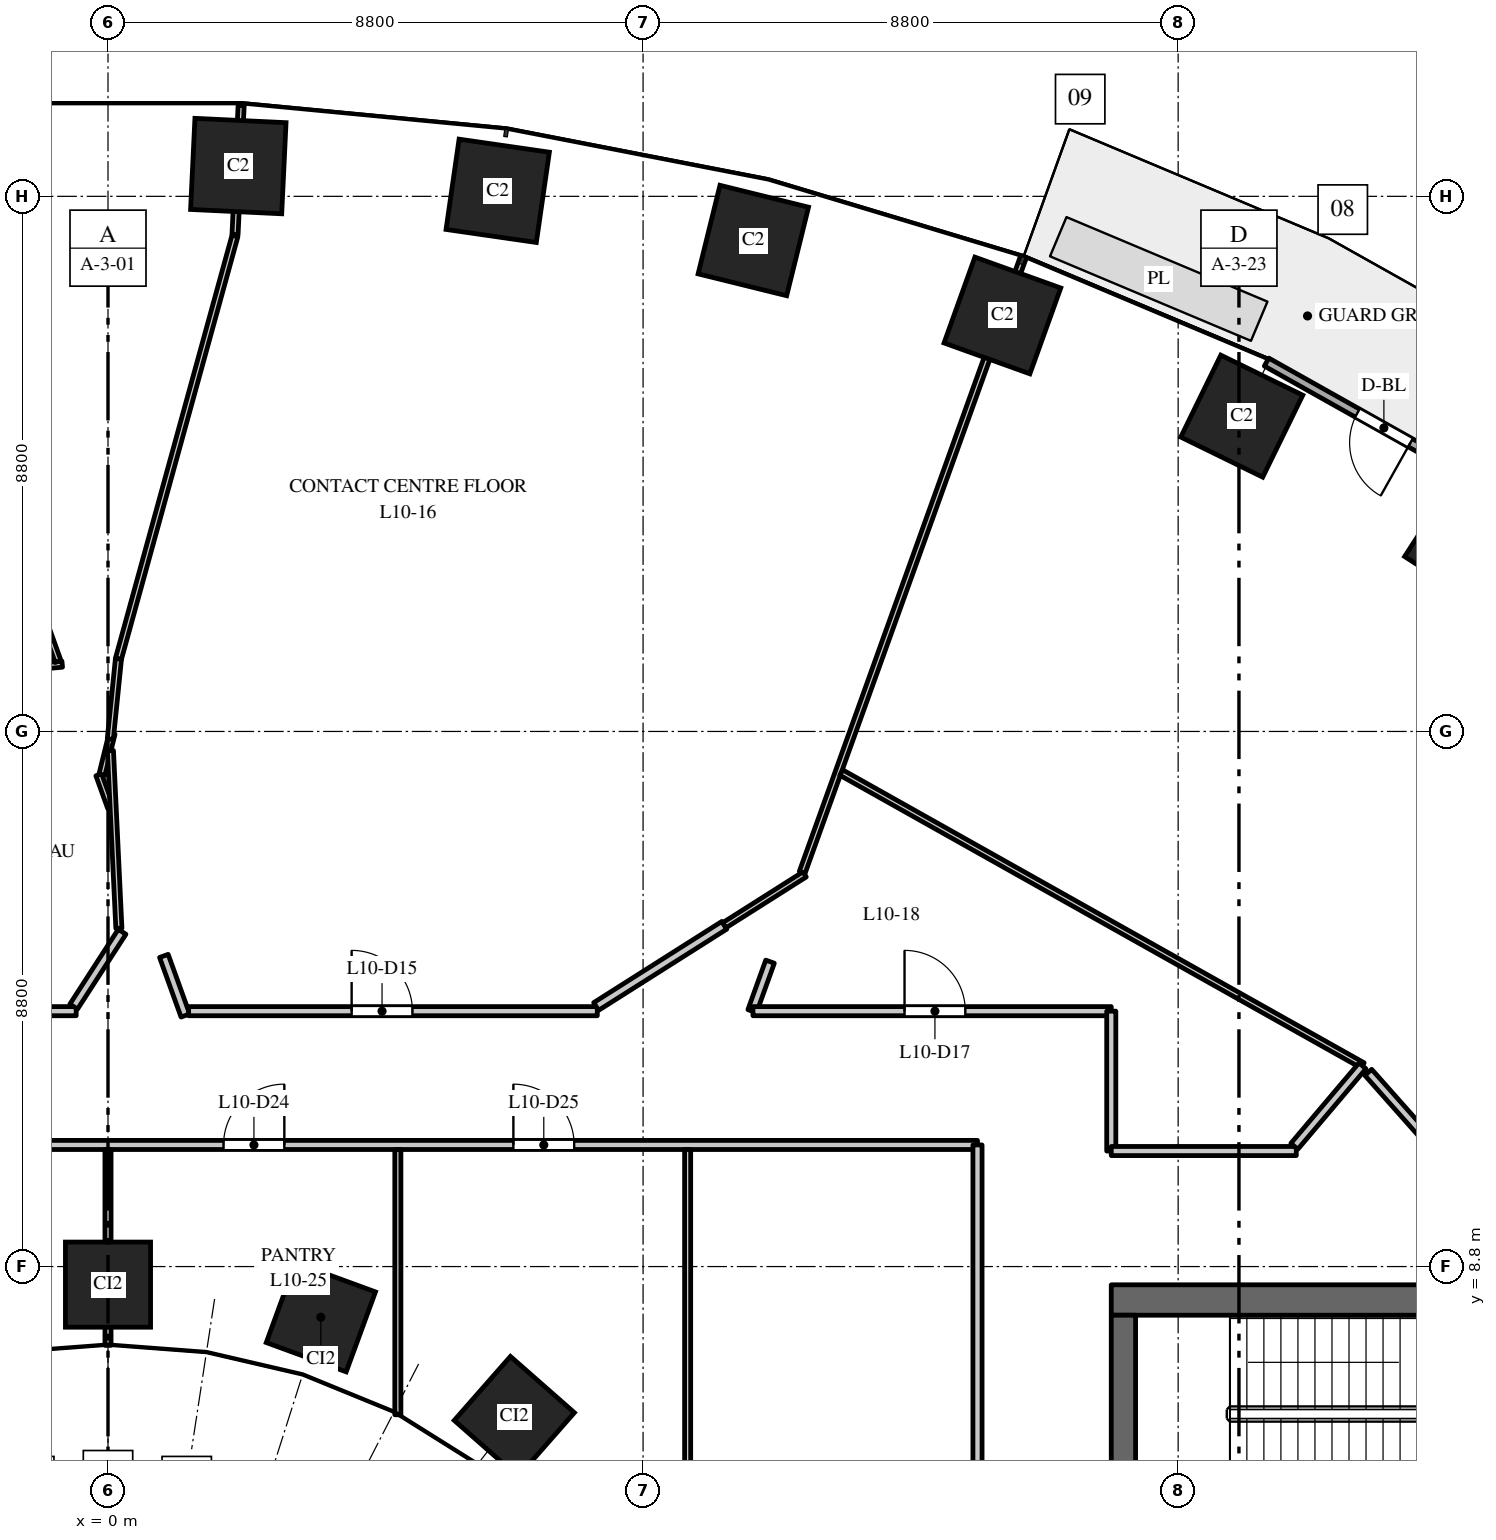
"""IFC4 building model, lengths in metres.
Left out: names, types, materials, properties, quantities, classifications, styles, units other than length and angle.
Written with IfcOpenShell. Run it as: python <this file> out.ifc"""

import sys

from ifc_helpers import new_model, si_unit, direction, frame, frame_2d, origin, origin_2d, place, context, subcontext, project, spatial, rectangle, extrude, element, fill, save


model = new_model("IFC4")
c1 = context("Model", 3, precision=1e-05, world=origin(), true_north=direction((0.0, 1.0)))
c2 = subcontext(c1, "Body", "Model", "MODEL_VIEW")
j1 = project(units=[si_unit("LENGTHUNIT", "METRE"), si_unit("PLANEANGLEUNIT", "RADIAN")], contexts=[c1])
p1 = place(None, origin())
s1 = spatial("IfcSite", under=j1, at=p1, CompositionType="ELEMENT")
p2 = place(p1, origin())
s2 = spatial("IfcBuilding", under=s1, at=p2, CompositionType="ELEMENT")
p3 = place(p2, frame((0.0, 0.0, 50.5)))
s3 = spatial("IfcBuildingStorey", under=s2, at=p3, CompositionType="ELEMENT", Elevation=50.5)
for number, where, z_axis, x_axis in (
    (1, (22.362, 20.7, 0.0), (0.0, 0.0, 1.0), (-0.84, 0.542, 0.0)),
    (2, (18.646, 22.785, 0.0), (0.0, 0.0, 1.0), (-0.898, 0.439, 0.0)),
    (3, (14.709, 24.441, 0.0), (0.0, 0.0, 1.0), (-0.941, 0.338, 0.0)),
    (4, (10.613, 25.674, 0.0), (0.0, 0.0, 1.0), (-0.971, 0.24, 0.0)),
    (5, (6.409, 26.491, 0.0), (0.0, 0.0, 1.0), (-0.99, 0.143, 0.0)),
    (6, (2.143, 26.898, 0.0), (0.0, 0.0, 1.0), (-0.999, 0.048, 0.0)),
):
    element("IfcColumn", number, at=place(p3, frame(where, z_axis=z_axis, x_axis=x_axis)), inside=s3, PredefinedType="COLUMN", context=c2, shape_type="SweptSolid", body=[
        extrude(rectangle(XDim=1.5, YDim=1.5, at=origin_2d()), origin(), (0.0, 0.0, 1.0), 4.0),
    ])
for number, where, z_axis, x_axis in (
    (7, (6.682, 6.334, 0.0), (0.0, 0.0, 1.0), (-0.751, 0.66, 0.0)),
    (8, (3.501, 7.967, 0.0), (0.0, 0.0, 1.0), (-0.939, 0.344, 0.0)),
    (9, (0.0, 8.503, 0.0), (0.0, 0.0, 1.0), (-1.0, 0.0, 0.0)),
):
    element("IfcColumn", number, at=place(p3, frame(where, z_axis=z_axis, x_axis=x_axis)), inside=s3, PredefinedType="COLUMN", context=c2, shape_type="SweptSolid", body=[
        extrude(rectangle(XDim=1.4, YDim=1.4, at=origin_2d()), origin(), (0.0, 0.0, 1.0), 4.0),
    ])
p4 = place(p3, frame((16.5, 8.25, 0.0), z_axis=(0.0, 0.0, 1.0), x_axis=(1.0, 0.0, 0.0)))
e10 = element("IfcWall", 10, at=p4, inside=s3, PredefinedType="SHEAR", context=c2, shape_type="SweptSolid", body=[
    extrude(rectangle(XDim=15.0, YDim=0.5, at=frame_2d((7.5, 0.0))), origin(), (0.0, 0.0, 1.0), 3.7),
])
p5 = place(p4, frame((6.9, 0.0, 0.0)))
e11 = element("IfcOpeningElement", 11, at=p5, cuts=e10, PredefinedType="OPENING", context=c2, shape_type="SweptSolid", body=[
    extrude(rectangle(XDim=1.2, YDim=2.1, at=frame_2d((0.6, 1.05))), frame((0.0, 0.26, 0.0), z_axis=(0.0, -1.0, 0.0), x_axis=(1.0, 0.0, 0.0)), (0.0, 0.0, 1.0), 0.52),
])
p6 = place(p4, frame((12.275, 0.0, 0.0)))
e12 = element("IfcOpeningElement", 12, at=p6, cuts=e10, PredefinedType="OPENING", context=c2, shape_type="SweptSolid", body=[
    extrude(rectangle(XDim=0.9, YDim=2.1, at=frame_2d((0.45, 1.05))), frame((0.0, 0.26, 0.0), z_axis=(0.0, -1.0, 0.0), x_axis=(1.0, 0.0, 0.0)), (0.0, 0.0, 1.0), 0.52),
])
p7 = place(p3, frame((16.7, -8.0, 0.0), z_axis=(0.0, 0.0, 1.0), x_axis=(0.0, 1.0, 0.0)))
e13 = element("IfcWall", 13, at=p7, inside=s3, PredefinedType="SHEAR", context=c2, shape_type="SweptSolid", body=[
    extrude(rectangle(XDim=16.0, YDim=0.4, at=frame_2d((8.0, 0.0))), origin(), (0.0, 0.0, 1.0), 3.7),
])
p8 = place(p3, frame((22.913, 21.509, 0.0), z_axis=(0.0, 0.0, 1.0), x_axis=(-0.872046572975, 0.489422899509, 0.0)))
e14 = element("IfcWall", 14, at=p8, inside=s3, PredefinedType="STANDARD", context=c2, shape_type="SweptSolid", body=[
    extrude(rectangle(XDim=4.426, YDim=0.15, at=frame_2d((2.213, 0.0))), origin(), (0.0, 0.0, 1.0), 3.7),
])
p9 = place(p8, frame((1.713, 0.0, 0.0)))
e15 = element("IfcOpeningElement", 15, at=p9, cuts=e14, PredefinedType="OPENING", context=c2, shape_type="SweptSolid", body=[
    extrude(rectangle(XDim=1.0, YDim=2.4, at=frame_2d((0.5, 1.2))), frame((0.0, 0.085, 0.0), z_axis=(0.0, -1.0, 0.0), x_axis=(1.0, 0.0, 0.0)), (0.0, 0.0, 1.0), 0.17),
])
p10 = place(p3, frame((-14.3, 10.8, 0.0), z_axis=(0.0, 0.0, 1.0), x_axis=(1.0, 0.0, 0.0)))
e16 = element("IfcWall", 16, at=p10, inside=s3, PredefinedType="PARTITIONING", context=c2, shape_type="SweptSolid", body=[
    extrude(rectangle(XDim=28.6, YDim=0.15, at=frame_2d((14.3, 0.0))), origin(), (0.0, 0.0, 1.0), 2.85),
])
p11 = place(p10, frame((11.433, 0.0, 0.0)))
e17 = element("IfcOpeningElement", 17, at=p11, cuts=e16, PredefinedType="OPENING", context=c2, shape_type="SweptSolid", body=[
    extrude(rectangle(XDim=1.0, YDim=2.1, at=frame_2d((0.5, 1.05))), frame((0.0, 0.085, 0.0), z_axis=(0.0, -1.0, 0.0), x_axis=(1.0, 0.0, 0.0)), (0.0, 0.0, 1.0), 0.17),
])
p12 = place(p10, frame((16.2, 0.0, 0.0)))
e18 = element("IfcOpeningElement", 18, at=p12, cuts=e16, PredefinedType="OPENING", context=c2, shape_type="SweptSolid", body=[
    extrude(rectangle(XDim=1.0, YDim=2.1, at=frame_2d((0.5, 1.05))), frame((0.0, 0.085, 0.0), z_axis=(0.0, -1.0, 0.0), x_axis=(1.0, 0.0, 0.0)), (0.0, 0.0, 1.0), 0.17),
])
p13 = place(p10, frame((20.967, 0.0, 0.0)))
e19 = element("IfcOpeningElement", 19, at=p13, cuts=e16, PredefinedType="OPENING", context=c2, shape_type="SweptSolid", body=[
    extrude(rectangle(XDim=1.0, YDim=2.1, at=frame_2d((0.5, 1.05))), frame((0.0, 0.085, 0.0), z_axis=(0.0, -1.0, 0.0), x_axis=(1.0, 0.0, 0.0)), (0.0, 0.0, 1.0), 0.17),
])
p14 = place(p3, frame((-8.704, 17.945, 0.0), z_axis=(0.0, 0.0, 1.0), x_axis=(0.995439666097, 0.095393244838, 0.0)))
e20 = element("IfcWall", 20, at=p14, inside=s3, PredefinedType="PARTITIONING", context=c2, shape_type="SweptSolid", body=[
    extrude(rectangle(XDim=7.988, YDim=0.1, at=frame_2d((3.994, 0.0))), origin(), (0.0, 0.0, 1.0), 2.85),
])
p15 = place(p3, frame((-7.483, 13.0, 0.0), z_axis=(0.0, 0.0, 1.0), x_axis=(1.0, 0.0, 0.0)))
e21 = element("IfcWall", 21, at=p15, inside=s3, PredefinedType="PARTITIONING", context=c2, shape_type="SweptSolid", body=[
    extrude(rectangle(XDim=6.96, YDim=0.15, at=frame_2d((3.48, 0.0))), origin(), (0.0, 0.0, 1.0), 2.85),
])
p16 = place(p15, frame((2.971, 0.0, 0.0)))
e22 = element("IfcOpeningElement", 22, at=p16, cuts=e21, PredefinedType="OPENING", context=c2, shape_type="SweptSolid", body=[
    extrude(rectangle(XDim=1.0, YDim=2.1, at=frame_2d((0.5, 1.05))), frame((0.0, 0.085, 0.0), z_axis=(0.0, -1.0, 0.0), x_axis=(1.0, 0.0, 0.0)), (0.0, 0.0, 1.0), 0.17),
])
p17 = place(p3, frame((-4.046, 27.717, 0.0), z_axis=(0.0, 0.0, 1.0), x_axis=(0.338447260677, -0.940985362129, 0.0)))
e23 = element("IfcWall", 23, at=p17, inside=s3, PredefinedType="PARTITIONING", context=c2, shape_type="SweptSolid", body=[
    extrude(rectangle(XDim=9.528, YDim=0.1, at=frame_2d((4.764, 0.0))), origin(), (0.0, 0.0, 1.0), 2.85),
])
p18 = place(p3, frame((-0.564, 13.075, 0.0), z_axis=(0.0, 0.0, 1.0), x_axis=(0.542961200627, 0.839757783301, 0.0)))
e24 = element("IfcWall", 24, at=p18, inside=s3, PredefinedType="PARTITIONING", context=c2, shape_type="SweptSolid", body=[
    extrude(rectangle(XDim=1.466, YDim=0.15, at=frame_2d((0.733, 0.0))), origin(), (0.0, 0.0, 1.0), 3.7),
])
p19 = place(p3, frame((-0.152, 16.888, 0.0), z_axis=(0.0, 0.0, 1.0), x_axis=(0.339185428329, -0.940719535892, 0.0)))
e25 = element("IfcWall", 25, at=p19, inside=s3, PredefinedType="PARTITIONING", context=c2, shape_type="SweptSolid", body=[
    extrude(rectangle(XDim=0.575, YDim=0.1, at=frame_2d((0.288, 0.0))), origin(), (0.0, 0.0, 1.0), 3.7),
])
p20 = place(p3, frame((-0.099, 16.892, 0.0), z_axis=(0.0, 0.0, 1.0), x_axis=(0.239223165208, 0.970964611728, 0.0)))
e26 = element("IfcWall", 26, at=p20, inside=s3, PredefinedType="PARTITIONING", context=c2, shape_type="SweptSolid", body=[
    extrude(rectangle(XDim=0.694, YDim=0.1, at=frame_2d((0.347, 0.0))), origin(), (0.0, 0.0, 1.0), 3.7),
])
p21 = place(p3, frame((0.0, 7.504, 0.0), z_axis=(0.0, 0.0, 1.0), x_axis=(0.0, 1.0, 0.0)))
e27 = element("IfcWall", 27, at=p21, inside=s3, PredefinedType="PARTITIONING", context=c2, shape_type="SweptSolid", body=[
    extrude(rectangle(XDim=3.221, YDim=0.1, at=frame_2d((1.611, 0.0))), origin(), (0.0, 0.0, 1.0), 3.7),
])
p22 = place(p3, frame((0.04, 17.284, 0.0), z_axis=(0.0, 0.0, 1.0), x_axis=(0.047505648741, -0.998870969314, 0.0)))
e28 = element("IfcWall", 28, at=p22, inside=s3, PredefinedType="PARTITIONING", context=c2, shape_type="SweptSolid", body=[
    extrude(rectangle(XDim=2.924, YDim=0.1, at=frame_2d((1.462, 0.0))), origin(), (0.0, 0.0, 1.0), 3.7),
])
p23 = place(p3, frame((0.038, 17.474, 0.0), z_axis=(0.0, 0.0, 1.0), x_axis=(0.100886401076, 0.99489795159, 0.0)))
e29 = element("IfcWall", 29, at=p23, inside=s3, PredefinedType="PARTITIONING", context=c2, shape_type="SweptSolid", body=[
    extrude(rectangle(XDim=1.329, YDim=0.1, at=frame_2d((0.664, 0.0))), origin(), (0.0, 0.0, 1.0), 3.7),
])
p24 = place(p3, frame((0.172, 18.796, 0.0), z_axis=(0.0, 0.0, 1.0), x_axis=(0.265628515821, 0.964075459486, 0.0)))
e30 = element("IfcWall", 30, at=p24, inside=s3, PredefinedType="PARTITIONING", context=c2, shape_type="SweptSolid", body=[
    extrude(rectangle(XDim=7.212, YDim=0.1, at=frame_2d((3.606, 0.0))), origin(), (0.0, 0.0, 1.0), 3.7),
])
p25 = place(p3, frame((0.919, 13.909, 0.0), z_axis=(0.0, 0.0, 1.0), x_axis=(0.338918653524, -0.94081568136, 0.0)))
e31 = element("IfcWall", 31, at=p25, inside=s3, PredefinedType="PARTITIONING", context=c2, shape_type="SweptSolid", body=[
    extrude(rectangle(XDim=1.042, YDim=0.15, at=frame_2d((0.521, 0.0))), origin(), (0.0, 0.0, 1.0), 3.7),
])
p26 = place(p3, frame((1.326, 13.0, 0.0), z_axis=(0.0, 0.0, 1.0), x_axis=(1.0, 0.0, 0.0)))
e32 = element("IfcWall", 32, at=p26, inside=s3, PredefinedType="PARTITIONING", context=c2, shape_type="SweptSolid", body=[
    extrude(rectangle(XDim=6.721, YDim=0.15, at=frame_2d((3.361, 0.0))), origin(), (0.0, 0.0, 1.0), 2.85),
])
p27 = place(p26, frame((2.681, 0.0, 0.0)))
e33 = element("IfcOpeningElement", 33, at=p27, cuts=e32, PredefinedType="OPENING", context=c2, shape_type="SweptSolid", body=[
    extrude(rectangle(XDim=1.0, YDim=2.1, at=frame_2d((0.5, 1.05))), frame((0.0, 0.085, 0.0), z_axis=(0.0, -1.0, 0.0), x_axis=(1.0, 0.0, 0.0)), (0.0, 0.0, 1.0), 0.17),
])
p28 = place(p3, frame((2.089, 25.77, 0.0), z_axis=(0.0, 0.0, 1.0), x_axis=(0.04733101585, 0.99887925944, 0.0)))
e34 = element("IfcWall", 34, at=p28, inside=s3, PredefinedType="PARTITIONING", context=c2, shape_type="SweptSolid", body=[
    extrude(rectangle(XDim=2.13, YDim=0.1, at=frame_2d((1.065, 0.0))), origin(), (0.0, 0.0, 1.0), 2.85),
])
p29 = place(p3, frame((4.767, 6.363, 0.0), z_axis=(0.0, 0.0, 1.0), x_axis=(0.0, 1.0, 0.0)))
e35 = element("IfcWall", 35, at=p29, inside=s3, PredefinedType="PARTITIONING", context=c2, shape_type="SweptSolid", body=[
    extrude(rectangle(XDim=4.362, YDim=0.1, at=frame_2d((2.181, 0.0))), origin(), (0.0, 0.0, 1.0), 2.85),
])
p30 = place(p3, frame((8.028, 13.077, 0.0), z_axis=(0.0, 0.0, 1.0), x_axis=(0.844718865656, 0.53521027457, 0.0)))
e36 = element("IfcWall", 36, at=p30, inside=s3, PredefinedType="PARTITIONING", context=c2, shape_type="SweptSolid", body=[
    extrude(rectangle(XDim=2.497, YDim=0.15, at=frame_2d((1.248, 0.0))), origin(), (0.0, 0.0, 1.0), 3.7),
])
p31 = place(p3, frame((9.533, -10.725, 0.0), z_axis=(0.0, 0.0, 1.0), x_axis=(0.0, 1.0, 0.0)))
e37 = element("IfcWall", 37, at=p31, inside=s3, PredefinedType="PARTITIONING", context=c2, shape_type="SweptSolid", body=[
    extrude(rectangle(XDim=21.45, YDim=0.1, at=frame_2d((10.725, 0.0))), origin(), (0.0, 0.0, 1.0), 2.75),
])
p32 = place(p3, frame((10.137, 14.413, 0.0), z_axis=(0.0, 0.0, 1.0), x_axis=(0.844849680057, 0.535003755228, 0.0)))
e38 = element("IfcWall", 38, at=p32, inside=s3, PredefinedType="PARTITIONING", context=c2, shape_type="SweptSolid", body=[
    extrude(rectangle(XDim=1.562, YDim=0.1, at=frame_2d((0.781, 0.0))), origin(), (0.0, 0.0, 1.0), 3.7),
])
p33 = place(p3, frame((10.595, 13.0, 0.0), z_axis=(0.0, 0.0, 1.0), x_axis=(0.338659506624, 0.940908995904, 0.0)))
e39 = element("IfcWall", 39, at=p33, inside=s3, PredefinedType="PARTITIONING", context=c2, shape_type="SweptSolid", body=[
    extrude(rectangle(XDim=0.865, YDim=0.15, at=frame_2d((0.433, 0.0))), origin(), (0.0, 0.0, 1.0), 3.7),
])
p34 = place(p3, frame((10.607, 13.0, 0.0), z_axis=(0.0, 0.0, 1.0), x_axis=(1.0, 0.0, 0.0)))
e40 = element("IfcWall", 40, at=p34, inside=s3, PredefinedType="PARTITIONING", context=c2, shape_type="SweptSolid", body=[
    extrude(rectangle(XDim=5.893, YDim=0.15, at=frame_2d((2.947, 0.0))), origin(), (0.0, 0.0, 1.0), 3.7),
])
p35 = place(p34, frame((2.493, 0.0, 0.0)))
e41 = element("IfcOpeningElement", 41, at=p35, cuts=e40, PredefinedType="OPENING", context=c2, shape_type="SweptSolid", body=[
    extrude(rectangle(XDim=1.0, YDim=2.1, at=frame_2d((0.5, 1.05))), frame((0.0, 0.085, 0.0), z_axis=(0.0, -1.0, 0.0), x_axis=(1.0, 0.0, 0.0)), (0.0, 0.0, 1.0), 0.17),
])
p36 = place(p3, frame((11.417, 15.282, 0.0), z_axis=(0.0, 0.0, 1.0), x_axis=(0.338283704349, 0.941044172912, 0.0)))
e42 = element("IfcWall", 42, at=p36, inside=s3, PredefinedType="PARTITIONING", context=c2, shape_type="SweptSolid", body=[
    extrude(rectangle(XDim=10.734, YDim=0.1, at=frame_2d((5.367, 0.0))), origin(), (0.0, 0.0, 1.0), 3.7),
])
p37 = place(p3, frame((12.06, 16.924, 0.0), z_axis=(0.0, 0.0, 1.0), x_axis=(0.871847863021, -0.489776789718, 0.0)))
e43 = element("IfcWall", 43, at=p37, inside=s3, PredefinedType="PARTITIONING", context=c2, shape_type="SweptSolid", body=[
    extrude(rectangle(XDim=9.835, YDim=0.1, at=frame_2d((4.918, 0.0))), origin(), (0.0, 0.0, 1.0), 3.7),
])
p38 = place(p3, frame((14.3, -10.8, 0.0), z_axis=(0.0, 0.0, 1.0), x_axis=(0.0, 1.0, 0.0)))
e44 = element("IfcWall", 44, at=p38, inside=s3, PredefinedType="PARTITIONING", context=c2, shape_type="SweptSolid", body=[
    extrude(rectangle(XDim=21.6, YDim=0.15, at=frame_2d((10.8, 0.0))), origin(), (0.0, 0.0, 1.0), 2.75),
])
p39 = place(p38, frame((10.2, 0.0, 0.0)))
e45 = element("IfcOpeningElement", 45, at=p39, cuts=e44, PredefinedType="OPENING", context=c2, shape_type="SweptSolid", body=[
    extrude(rectangle(XDim=1.0, YDim=2.1, at=frame_2d((0.5, 1.05))), frame((0.0, 0.085, 0.0), z_axis=(0.0, -1.0, 0.0), x_axis=(1.0, 0.0, 0.0)), (0.0, 0.0, 1.0), 0.17),
])
p40 = place(p3, frame((16.5, 10.7, 0.0), z_axis=(0.0, 0.0, 1.0), x_axis=(0.0, 1.0, 0.0)))
e46 = element("IfcWall", 46, at=p40, inside=s3, PredefinedType="PARTITIONING", context=c2, shape_type="SweptSolid", body=[
    extrude(rectangle(XDim=2.3, YDim=0.15, at=frame_2d((1.15, 0.0))), origin(), (0.0, 0.0, 1.0), 3.7),
])
p41 = place(p3, frame((16.5, 10.7, 0.0), z_axis=(0.0, 0.0, 1.0), x_axis=(1.0, 0.0, 0.0)))
e47 = element("IfcWall", 47, at=p41, inside=s3, PredefinedType="PARTITIONING", context=c2, shape_type="SweptSolid", body=[
    extrude(rectangle(XDim=3.043, YDim=0.15, at=frame_2d((1.521, 0.0))), origin(), (0.0, 0.0, 1.0), 3.7),
])
p42 = place(p3, frame((19.511, 10.778, 0.0), z_axis=(0.0, 0.0, 1.0), x_axis=(0.646491141339, 0.762921492796, 0.0)))
e48 = element("IfcWall", 48, at=p42, inside=s3, PredefinedType="PARTITIONING", context=c2, shape_type="SweptSolid", body=[
    extrude(rectangle(XDim=1.734, YDim=0.15, at=frame_2d((0.867, 0.0))), origin(), (0.0, 0.0, 1.0), 3.7),
])
p43 = place(p3, frame((20.727, 11.994, 0.0), z_axis=(0.0, 0.0, 1.0), x_axis=(0.663767495264, -0.747938976275, 0.0)))
e49 = element("IfcWall", 49, at=p43, inside=s3, PredefinedType="PARTITIONING", context=c2, shape_type="SweptSolid", body=[
    extrude(rectangle(XDim=1.83, YDim=0.15, at=frame_2d((0.915, 0.0))), origin(), (0.0, 0.0, 1.0), 2.75),
])
p44 = place(p9, origin())
e50 = element("IfcDoor", 50, at=p44, inside=s3, OperationType="SINGLE_SWING_LEFT", PredefinedType="DOOR", context=c2, shape_type="SweptSolid", body=[
    extrude(rectangle(XDim=1.0, YDim=2.4, at=frame_2d((0.5, 1.2))), frame((0.0, 0.025, 0.0), z_axis=(0.0, -1.0, 0.0), x_axis=(1.0, 0.0, 0.0)), (0.0, 0.0, 1.0), 0.05),
])
fill(e15, e50)
p45 = place(p27, origin())
e51 = element("IfcDoor", 51, at=p45, inside=s3, OperationType="SINGLE_SWING_LEFT", PredefinedType="DOOR", context=c2, shape_type="SweptSolid", body=[
    extrude(rectangle(XDim=1.0, YDim=2.1, at=frame_2d((0.5, 1.05))), frame((0.0, 0.025, 0.0), z_axis=(0.0, -1.0, 0.0), x_axis=(1.0, 0.0, 0.0)), (0.0, 0.0, 1.0), 0.05),
])
fill(e33, e51)
p46 = place(p35, origin())
e52 = element("IfcDoor", 52, at=p46, inside=s3, OperationType="SINGLE_SWING_LEFT", PredefinedType="DOOR", context=c2, shape_type="SweptSolid", body=[
    extrude(rectangle(XDim=1.0, YDim=2.1, at=frame_2d((0.5, 1.05))), frame((0.0, 0.025, 0.0), z_axis=(0.0, -1.0, 0.0), x_axis=(1.0, 0.0, 0.0)), (0.0, 0.0, 1.0), 0.05),
])
fill(e41, e52)
p47 = place(p12, origin())
e53 = element("IfcDoor", 53, at=p47, inside=s3, OperationType="SINGLE_SWING_RIGHT", PredefinedType="DOOR", context=c2, shape_type="SweptSolid", body=[
    extrude(rectangle(XDim=1.0, YDim=2.1, at=frame_2d((0.5, 1.05))), frame((0.0, 0.025, 0.0), z_axis=(0.0, -1.0, 0.0), x_axis=(1.0, 0.0, 0.0)), (0.0, 0.0, 1.0), 0.05),
])
fill(e18, e53)
p48 = place(p13, origin())
e54 = element("IfcDoor", 54, at=p48, inside=s3, OperationType="SINGLE_SWING_LEFT", PredefinedType="DOOR", context=c2, shape_type="SweptSolid", body=[
    extrude(rectangle(XDim=1.0, YDim=2.1, at=frame_2d((0.5, 1.05))), frame((0.0, 0.025, 0.0), z_axis=(0.0, -1.0, 0.0), x_axis=(1.0, 0.0, 0.0)), (0.0, 0.0, 1.0), 0.05),
])
fill(e19, e54)
save(model, sys.argv[1])
